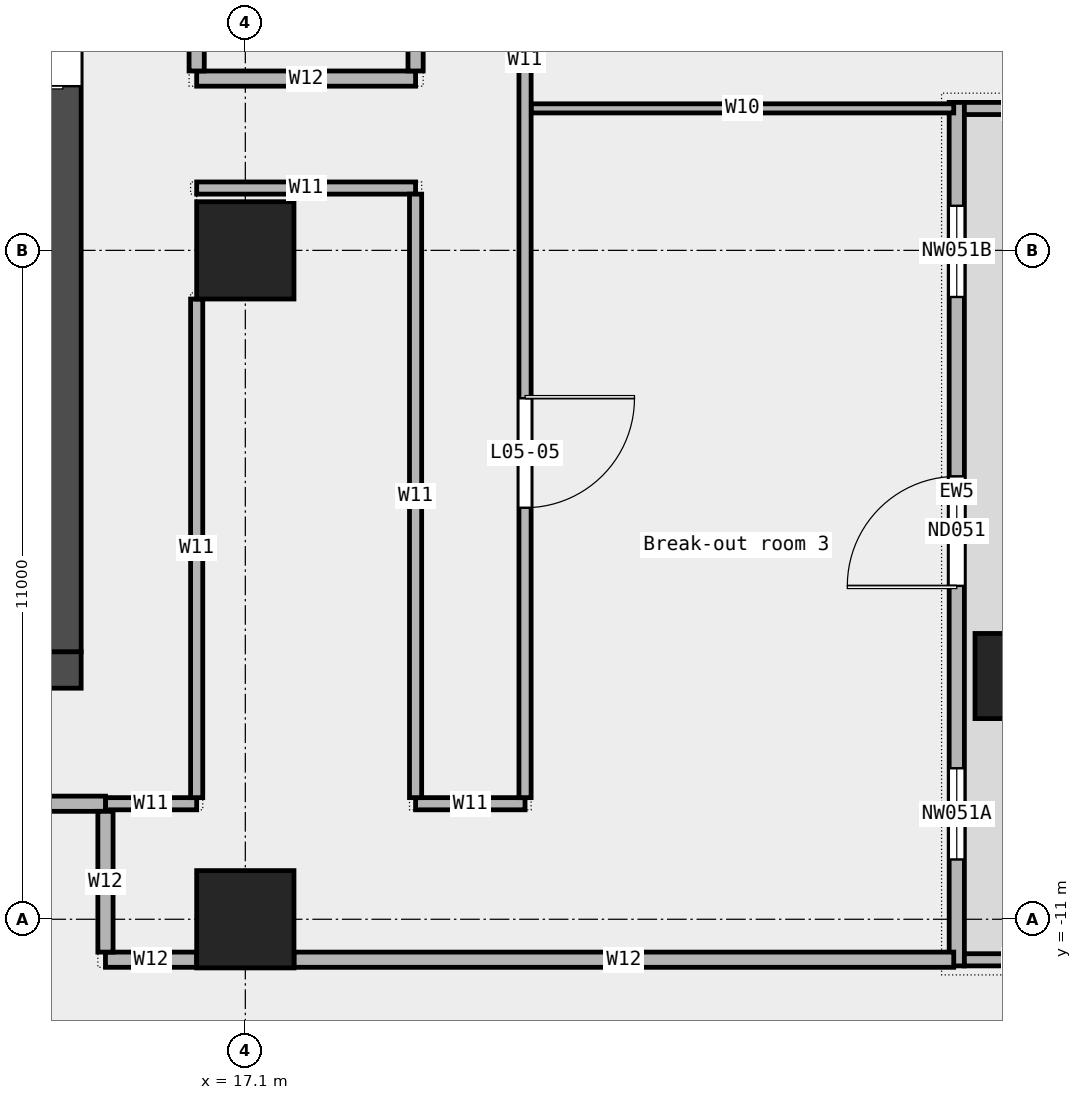
"""IFC4 building model, lengths in metres.
Left out: names, types, materials, properties, quantities, classifications, styles, units other than length and angle.
Written with IfcOpenShell. Run it as: python <this file> out.ifc"""

import sys

from ifc_helpers import new_model, si_unit, direction, frame, frame_2d, origin, origin_2d, place, context, subcontext, project, spatial, rectangle, extrude, element, fill, save


model = new_model("IFC4")
c1 = context("Model", 3, precision=1e-05, world=origin(), true_north=direction((0.0, 1.0)))
c2 = subcontext(c1, "Body", "Model", "MODEL_VIEW")
j1 = project(units=[si_unit("LENGTHUNIT", "METRE"), si_unit("PLANEANGLEUNIT", "RADIAN")], contexts=[c1])
p1 = place(None, origin())
s1 = spatial("IfcSite", under=j1, at=p1, CompositionType="ELEMENT")
p2 = place(p1, origin())
s2 = spatial("IfcBuilding", under=s1, at=p2, CompositionType="ELEMENT")
p3 = place(p2, frame((0.0, 0.0, 31.0)))
s3 = spatial("IfcBuildingStorey", under=s2, at=p3, CompositionType="ELEMENT", Elevation=31.0)
p4 = place(p3, frame((29.8, -7.0, 0.0), z_axis=(0.0, 0.0, 1.0), x_axis=(1.0, 0.0, 0.0)))
e1 = element("IfcColumn", 1, at=p4, inside=s3, PredefinedType="COLUMN", context=c2, shape_type="SweptSolid", body=[
    extrude(rectangle(XDim=1.4, YDim=1.4, at=origin_2d()), origin(), (0.0, 0.0, 1.0), 4.35),
])
for number, where, z_axis, x_axis in (
    (2, (17.1, -11.0, 0.0), (0.0, 0.0, 1.0), (1.0, 0.0, 0.0)),
    (3, (17.1, 0.0, 0.0), (0.0, 0.0, 1.0), (1.0, 0.0, 0.0)),
):
    element("IfcColumn", number, at=place(p3, frame(where, z_axis=z_axis, x_axis=x_axis)), inside=s3, PredefinedType="COLUMN", context=c2, shape_type="SweptSolid", body=[
        extrude(rectangle(XDim=1.6, YDim=1.6, at=origin_2d()), origin(), (0.0, 0.0, 1.0), 4.35),
    ])
p5 = place(p3, frame((28.8, -11.767, 0.0), z_axis=(0.0, 0.0, 1.0), x_axis=(0.0, 1.0, 0.0)))
e4 = element("IfcWall", 4, at=p5, inside=s3, PredefinedType="STANDARD", context=c2, shape_type="SweptSolid", body=[
    extrude(rectangle(XDim=14.2, YDim=0.25, at=frame_2d((7.1, 0.0))), origin(), (0.0, 0.0, 1.0), 4.35),
])
p6 = place(p5, frame((1.75, 0.0, 0.45)))
e5 = element("IfcOpeningElement", 5, at=p6, cuts=e4, PredefinedType="OPENING", context=c2, shape_type="SweptSolid", body=[
    extrude(rectangle(XDim=1.5, YDim=3.0, at=frame_2d((0.75, 1.5))), frame((0.0, 0.137, 0.0), z_axis=(0.0, -1.0, 0.0), x_axis=(1.0, 0.0, 0.0)), (0.0, 0.0, 1.0), 0.274),
])
p7 = place(p5, frame((6.25, 0.0, 0.0)))
e6 = element("IfcOpeningElement", 6, at=p7, cuts=e4, PredefinedType="OPENING", context=c2, shape_type="SweptSolid", body=[
    extrude(rectangle(XDim=1.8, YDim=2.4, at=frame_2d((0.9, 1.2))), frame((0.0, 0.137, 0.0), z_axis=(0.0, -1.0, 0.0), x_axis=(1.0, 0.0, 0.0)), (0.0, 0.0, 1.0), 0.274),
])
p8 = place(p5, frame((11.0, 0.0, 0.45)))
e7 = element("IfcOpeningElement", 7, at=p8, cuts=e4, PredefinedType="OPENING", context=c2, shape_type="SweptSolid", body=[
    extrude(rectangle(XDim=1.5, YDim=3.0, at=frame_2d((0.75, 1.5))), frame((0.0, 0.137, 0.0), z_axis=(0.0, -1.0, 0.0), x_axis=(1.0, 0.0, 0.0)), (0.0, 0.0, 1.0), 0.274),
])
for number, where, z_axis, x_axis in (
    (8, (30.8, -11.667, 0.0), (0.0, 0.0, 1.0), (-1.0, 0.0, 0.0)),
    (9, (30.8, 2.333, 0.0), (0.0, 0.0, 1.0), (-1.0, 0.0, 0.0)),
):
    element("IfcWall", number, at=place(p3, frame(where, z_axis=z_axis, x_axis=x_axis)), inside=s3, PredefinedType="STANDARD", context=c2, shape_type="SweptSolid", body=[
        extrude(rectangle(XDim=1.875, YDim=0.2, at=frame_2d((0.938, 0.0))), origin(), (0.0, 0.0, 1.0), 4.35),
    ])
p9 = place(p3, frame((14.8, -11.665, 0.0), z_axis=(0.0, 0.0, 1.0), x_axis=(1.0, 0.0, 0.0)))
e10 = element("IfcWall", 10, at=p9, inside=s3, PredefinedType="PARTITIONING", context=c2, shape_type="SweptSolid", body=[
    extrude(rectangle(XDim=1.5, YDim=0.25, at=frame_2d((0.75, 0.0))), origin(), (0.0, 0.0, 1.0), 4.35),
])
p10 = place(p3, frame((17.9, -11.665, 0.0), z_axis=(0.0, 0.0, 1.0), x_axis=(1.0, 0.0, 0.0)))
e11 = element("IfcWall", 11, at=p10, inside=s3, PredefinedType="PARTITIONING", context=c2, shape_type="SweptSolid", body=[
    extrude(rectangle(XDim=10.85, YDim=0.25, at=frame_2d((5.425, 0.0))), origin(), (0.0, 0.0, 1.0), 4.35),
])
p11 = place(p3, frame((14.8, -9.1, 0.0), z_axis=(0.0, 0.0, 1.0), x_axis=(1.0, 0.0, 0.0)))
e12 = element("IfcWall", 12, at=p11, inside=s3, PredefinedType="PARTITIONING", context=c2, shape_type="SweptSolid", body=[
    extrude(rectangle(XDim=1.5, YDim=0.2, at=frame_2d((0.75, 0.0))), origin(), (0.0, 0.0, 1.0), 4.35),
])
p12 = place(p3, frame((19.9, -9.1, 0.0), z_axis=(0.0, 0.0, 1.0), x_axis=(1.0, 0.0, 0.0)))
e13 = element("IfcWall", 13, at=p12, inside=s3, PredefinedType="PARTITIONING", context=c2, shape_type="SweptSolid", body=[
    extrude(rectangle(XDim=1.8, YDim=0.2, at=frame_2d((0.9, 0.0))), origin(), (0.0, 0.0, 1.0), 4.35),
])
p13 = place(p3, frame((-14.8, -9.1, 0.0), z_axis=(0.0, 0.0, 1.0), x_axis=(1.0, 0.0, 0.0)))
e14 = element("IfcWall", 14, at=p13, inside=s3, PredefinedType="PARTITIONING", context=c2, shape_type="SweptSolid", body=[
    extrude(rectangle(XDim=29.6, YDim=0.25, at=frame_2d((14.8, 0.0))), origin(), (0.0, 0.0, 1.0), 4.35),
])
p14 = place(p13, frame((22.998, 0.0, 0.0)))
e15 = element("IfcOpeningElement", 15, at=p14, cuts=e14, PredefinedType="OPENING", context=c2, shape_type="SweptSolid", body=[
    extrude(rectangle(XDim=1.8, YDim=2.1, at=frame_2d((0.9, 1.05))), frame((0.0, 0.137, 0.0), z_axis=(0.0, -1.0, 0.0), x_axis=(1.0, 0.0, 0.0)), (0.0, 0.0, 1.0), 0.274),
])
p15 = place(p13, frame((9.998, 0.0, 0.0)))
e16 = element("IfcOpeningElement", 16, at=p15, cuts=e14, PredefinedType="OPENING", context=c2, shape_type="SweptSolid", body=[
    extrude(rectangle(XDim=1.8, YDim=2.1, at=frame_2d((0.9, 1.05))), frame((0.0, 0.137, 0.0), z_axis=(0.0, -1.0, 0.0), x_axis=(1.0, 0.0, 0.0)), (0.0, 0.0, 1.0), 0.274),
])
p16 = place(p3, frame((16.3, 1.025, 0.0), z_axis=(0.0, 0.0, 1.0), x_axis=(1.0, 0.0, 0.0)))
e17 = element("IfcWall", 17, at=p16, inside=s3, PredefinedType="PARTITIONING", context=c2, shape_type="SweptSolid", body=[
    extrude(rectangle(XDim=3.6, YDim=0.2, at=frame_2d((1.8, 0.0))), origin(), (0.0, 0.0, 1.0), 4.35),
])
p17 = place(p3, frame((21.8, 2.335, 0.0), z_axis=(0.0, 0.0, 1.0), x_axis=(1.0, 0.0, 0.0)))
e18 = element("IfcWall", 18, at=p17, inside=s3, PredefinedType="PARTITIONING", context=c2, shape_type="SweptSolid", body=[
    extrude(rectangle(XDim=6.95, YDim=0.15, at=frame_2d((3.475, 0.0))), origin(), (0.0, 0.0, 1.0), 4.35),
])
p18 = place(p3, frame((16.3, 2.825, 0.0), z_axis=(0.0, 0.0, 1.0), x_axis=(1.0, 0.0, 0.0)))
e19 = element("IfcWall", 19, at=p18, inside=s3, PredefinedType="PARTITIONING", context=c2, shape_type="SweptSolid", body=[
    extrude(rectangle(XDim=3.6, YDim=0.25, at=frame_2d((1.8, 0.0))), origin(), (0.0, 0.0, 1.0), 4.35),
])
p19 = place(p3, frame((14.8, -11.54, 0.0), z_axis=(0.0, 0.0, 1.0), x_axis=(0.0, 1.0, 0.0)))
e20 = element("IfcWall", 20, at=p19, inside=s3, PredefinedType="PARTITIONING", context=c2, shape_type="SweptSolid", body=[
    extrude(rectangle(XDim=2.315, YDim=0.25, at=frame_2d((1.157, 0.0))), origin(), (0.0, 0.0, 1.0), 4.35),
])
p20 = place(p3, frame((16.3, -9.0, 0.0), z_axis=(0.0, 0.0, 1.0), x_axis=(0.0, 1.0, 0.0)))
e21 = element("IfcWall", 21, at=p20, inside=s3, PredefinedType="PARTITIONING", context=c2, shape_type="SweptSolid", body=[
    extrude(rectangle(XDim=8.2, YDim=0.2, at=frame_2d((4.1, 0.0))), origin(), (0.0, 0.0, 1.0), 4.35),
])
p21 = place(p3, frame((16.3, 2.95, 0.0), z_axis=(0.0, 0.0, 1.0), x_axis=(0.0, 1.0, 0.0)))
e22 = element("IfcWall", 22, at=p21, inside=s3, PredefinedType="PARTITIONING", context=c2, shape_type="SweptSolid", body=[
    extrude(rectangle(XDim=7.25, YDim=0.25, at=frame_2d((3.625, 0.0))), origin(), (0.0, 0.0, 1.0), 4.35),
])
p22 = place(p3, frame((19.9, -9.0, 0.0), z_axis=(0.0, 0.0, 1.0), x_axis=(0.0, 1.0, 0.0)))
e23 = element("IfcWall", 23, at=p22, inside=s3, PredefinedType="PARTITIONING", context=c2, shape_type="SweptSolid", body=[
    extrude(rectangle(XDim=9.925, YDim=0.2, at=frame_2d((4.962, 0.0))), origin(), (0.0, 0.0, 1.0), 4.35),
])
p23 = place(p3, frame((19.9, 2.95, 0.0), z_axis=(0.0, 0.0, 1.0), x_axis=(0.0, 1.0, 0.0)))
e24 = element("IfcWall", 24, at=p23, inside=s3, PredefinedType="PARTITIONING", context=c2, shape_type="SweptSolid", body=[
    extrude(rectangle(XDim=12.3, YDim=0.25, at=frame_2d((6.15, 0.0))), origin(), (0.0, 0.0, 1.0), 4.35),
])
p24 = place(p23, frame((9.16, 0.0, 0.0)))
e25 = element("IfcOpeningElement", 25, at=p24, cuts=e24, PredefinedType="OPENING", context=c2, shape_type="SweptSolid", body=[
    extrude(rectangle(XDim=0.9, YDim=2.1, at=frame_2d((0.45, 1.05))), frame((0.0, 0.137, 0.0), z_axis=(0.0, -1.0, 0.0), x_axis=(1.0, 0.0, 0.0)), (0.0, 0.0, 1.0), 0.274),
])
p25 = place(p23, frame((3.01, 0.0, 0.0)))
e26 = element("IfcOpeningElement", 26, at=p25, cuts=e24, PredefinedType="OPENING", context=c2, shape_type="SweptSolid", body=[
    extrude(rectangle(XDim=0.9, YDim=2.1, at=frame_2d((0.45, 1.05))), frame((0.0, 0.137, 0.0), z_axis=(0.0, -1.0, 0.0), x_axis=(1.0, 0.0, 0.0)), (0.0, 0.0, 1.0), 0.274),
])
p26 = place(p3, frame((21.7, -9.0, 0.0), z_axis=(0.0, 0.0, 1.0), x_axis=(0.0, 1.0, 0.0)))
e27 = element("IfcWall", 27, at=p26, inside=s3, PredefinedType="PARTITIONING", context=c2, shape_type="SweptSolid", body=[
    extrude(rectangle(XDim=24.275, YDim=0.2, at=frame_2d((12.137, 0.0))), origin(), (0.0, 0.0, 1.0), 4.35),
])
p27 = place(p26, frame((4.768, 0.0, 0.0)))
e28 = element("IfcOpeningElement", 28, at=p27, cuts=e27, PredefinedType="OPENING", context=c2, shape_type="SweptSolid", body=[
    extrude(rectangle(XDim=1.8, YDim=2.1, at=frame_2d((0.9, 1.05))), frame((0.0, 0.112, 0.0), z_axis=(0.0, -1.0, 0.0), x_axis=(1.0, 0.0, 0.0)), (0.0, 0.0, 1.0), 0.224),
])
p28 = place(p26, frame((17.055, 0.0, 0.0)))
e29 = element("IfcOpeningElement", 29, at=p28, cuts=e27, PredefinedType="OPENING", context=c2, shape_type="SweptSolid", body=[
    extrude(rectangle(XDim=1.5, YDim=2.1, at=frame_2d((0.75, 1.05))), frame((0.0, 0.112, 0.0), z_axis=(0.0, -1.0, 0.0), x_axis=(1.0, 0.0, 0.0)), (0.0, 0.0, 1.0), 0.224),
])
p29 = place(p3, frame((-14.4, -6.9, 0.0), z_axis=(0.0, 0.0, 1.0), x_axis=(1.0, 0.0, 0.0)))
e30 = element("IfcWall", 30, at=p29, inside=s3, PredefinedType="SHEAR", context=c2, shape_type="SweptSolid", body=[
    extrude(rectangle(XDim=28.8, YDim=0.6, at=frame_2d((14.4, 0.0))), origin(), (0.0, 0.0, 1.0), 4.5),
])
p30 = place(p29, frame((4.337, 0.0, 0.0)))
e31 = element("IfcOpeningElement", 31, at=p30, cuts=e30, PredefinedType="OPENING", context=c2, shape_type="SweptSolid", body=[
    extrude(rectangle(XDim=1.0, YDim=2.1, at=frame_2d((0.5, 1.05))), frame((0.0, 0.312, 0.0), z_axis=(0.0, -1.0, 0.0), x_axis=(1.0, 0.0, 0.0)), (0.0, 0.0, 1.0), 0.624),
])
p31 = place(p29, frame((6.212, 0.0, 0.0)))
e32 = element("IfcOpeningElement", 32, at=p31, cuts=e30, PredefinedType="OPENING", context=c2, shape_type="SweptSolid", body=[
    extrude(rectangle(XDim=1.0, YDim=2.1, at=frame_2d((0.5, 1.05))), frame((0.0, 0.312, 0.0), z_axis=(0.0, -1.0, 0.0), x_axis=(1.0, 0.0, 0.0)), (0.0, 0.0, 1.0), 0.624),
])
p32 = place(p29, frame((10.8, 0.0, 0.0)))
e33 = element("IfcOpeningElement", 33, at=p32, cuts=e30, PredefinedType="OPENING", context=c2, shape_type="SweptSolid", body=[
    extrude(rectangle(XDim=1.2, YDim=2.1, at=frame_2d((0.6, 1.05))), frame((0.0, 0.312, 0.0), z_axis=(0.0, -1.0, 0.0), x_axis=(1.0, 0.0, 0.0)), (0.0, 0.0, 1.0), 0.624),
])
p33 = place(p29, frame((15.587, 0.0, 0.0)))
e34 = element("IfcOpeningElement", 34, at=p33, cuts=e30, PredefinedType="OPENING", context=c2, shape_type="SweptSolid", body=[
    extrude(rectangle(XDim=1.0, YDim=2.1, at=frame_2d((0.5, 1.05))), frame((0.0, 0.312, 0.0), z_axis=(0.0, -1.0, 0.0), x_axis=(1.0, 0.0, 0.0)), (0.0, 0.0, 1.0), 0.624),
])
p34 = place(p29, frame((18.75, 0.0, 0.0)))
e35 = element("IfcOpeningElement", 35, at=p34, cuts=e30, PredefinedType="OPENING", context=c2, shape_type="SweptSolid", body=[
    extrude(rectangle(XDim=1.8, YDim=2.1, at=frame_2d((0.9, 1.05))), frame((0.0, 0.312, 0.0), z_axis=(0.0, -1.0, 0.0), x_axis=(1.0, 0.0, 0.0)), (0.0, 0.0, 1.0), 0.624),
])
p35 = place(p29, frame((23.087, 0.0, 0.0)))
e36 = element("IfcOpeningElement", 36, at=p35, cuts=e30, PredefinedType="OPENING", context=c2, shape_type="SweptSolid", body=[
    extrude(rectangle(XDim=1.0, YDim=2.1, at=frame_2d((0.5, 1.05))), frame((0.0, 0.312, 0.0), z_axis=(0.0, -1.0, 0.0), x_axis=(1.0, 0.0, 0.0)), (0.0, 0.0, 1.0), 0.624),
])
p36 = place(p3, frame((14.1, -6.6, 0.0), z_axis=(0.0, 0.0, 1.0), x_axis=(0.0, 1.0, 0.0)))
e37 = element("IfcWall", 37, at=p36, inside=s3, PredefinedType="SHEAR", context=c2, shape_type="SweptSolid", body=[
    extrude(rectangle(XDim=19.5, YDim=0.6, at=frame_2d((9.75, 0.0))), origin(), (0.0, 0.0, 1.0), 4.5),
])
p37 = place(p36, frame((9.3, 0.0, 0.0)))
e38 = element("IfcOpeningElement", 38, at=p37, cuts=e37, PredefinedType="OPENING", context=c2, shape_type="SweptSolid", body=[
    extrude(rectangle(XDim=1.8, YDim=2.1, at=frame_2d((0.9, 1.05))), frame((0.0, 0.312, 0.0), z_axis=(0.0, -1.0, 0.0), x_axis=(1.0, 0.0, 0.0)), (0.0, 0.0, 1.0), 0.624),
])
p38 = place(p6, origin())
e39 = element("IfcWindow", 39, at=p38, inside=s3, PartitioningType="SINGLE_PANEL", PredefinedType="WINDOW", context=c2, shape_type="SweptSolid", body=[
    extrude(rectangle(XDim=1.5, YDim=3.0, at=frame_2d((0.75, 1.5))), frame((0.0, 0.03, 0.0), z_axis=(0.0, -1.0, 0.0), x_axis=(1.0, 0.0, 0.0)), (0.0, 0.0, 1.0), 0.06),
])
fill(e5, e39)
p39 = place(p7, origin())
e40 = element("IfcDoor", 40, at=p39, inside=s3, OperationType="DOUBLE_DOOR_SINGLE_SWING", PredefinedType="DOOR", context=c2, shape_type="SweptSolid", body=[
    extrude(rectangle(XDim=1.8, YDim=2.4, at=frame_2d((0.9, 1.2))), frame((0.0, 0.025, 0.0), z_axis=(0.0, -1.0, 0.0), x_axis=(1.0, 0.0, 0.0)), (0.0, 0.0, 1.0), 0.05),
])
fill(e6, e40)
p40 = place(p8, origin())
e41 = element("IfcWindow", 41, at=p40, inside=s3, PartitioningType="SINGLE_PANEL", PredefinedType="WINDOW", context=c2, shape_type="SweptSolid", body=[
    extrude(rectangle(XDim=1.5, YDim=3.0, at=frame_2d((0.75, 1.5))), frame((0.0, 0.03, 0.0), z_axis=(0.0, -1.0, 0.0), x_axis=(1.0, 0.0, 0.0)), (0.0, 0.0, 1.0), 0.06),
])
fill(e7, e41)
p41 = place(p27, origin())
e42 = element("IfcDoor", 42, at=p41, inside=s3, OperationType="DOUBLE_DOOR_SINGLE_SWING", PredefinedType="DOOR", context=c2, shape_type="SweptSolid", body=[
    extrude(rectangle(XDim=1.8, YDim=2.1, at=frame_2d((0.9, 1.05))), frame((0.0, 0.025, 0.0), z_axis=(0.0, -1.0, 0.0), x_axis=(1.0, 0.0, 0.0)), (0.0, 0.0, 1.0), 0.05),
])
fill(e28, e42)
p42 = place(p37, origin())
e43 = element("IfcDoor", 43, at=p42, inside=s3, OperationType="DOUBLE_DOOR_SINGLE_SWING", PredefinedType="DOOR", context=c2, shape_type="SweptSolid", body=[
    extrude(rectangle(XDim=1.8, YDim=2.1, at=frame_2d((0.9, 1.05))), frame((0.0, 0.025, 0.0), z_axis=(0.0, -1.0, 0.0), x_axis=(1.0, 0.0, 0.0)), (0.0, 0.0, 1.0), 0.05),
])
fill(e38, e43)
save(model, sys.argv[1])
